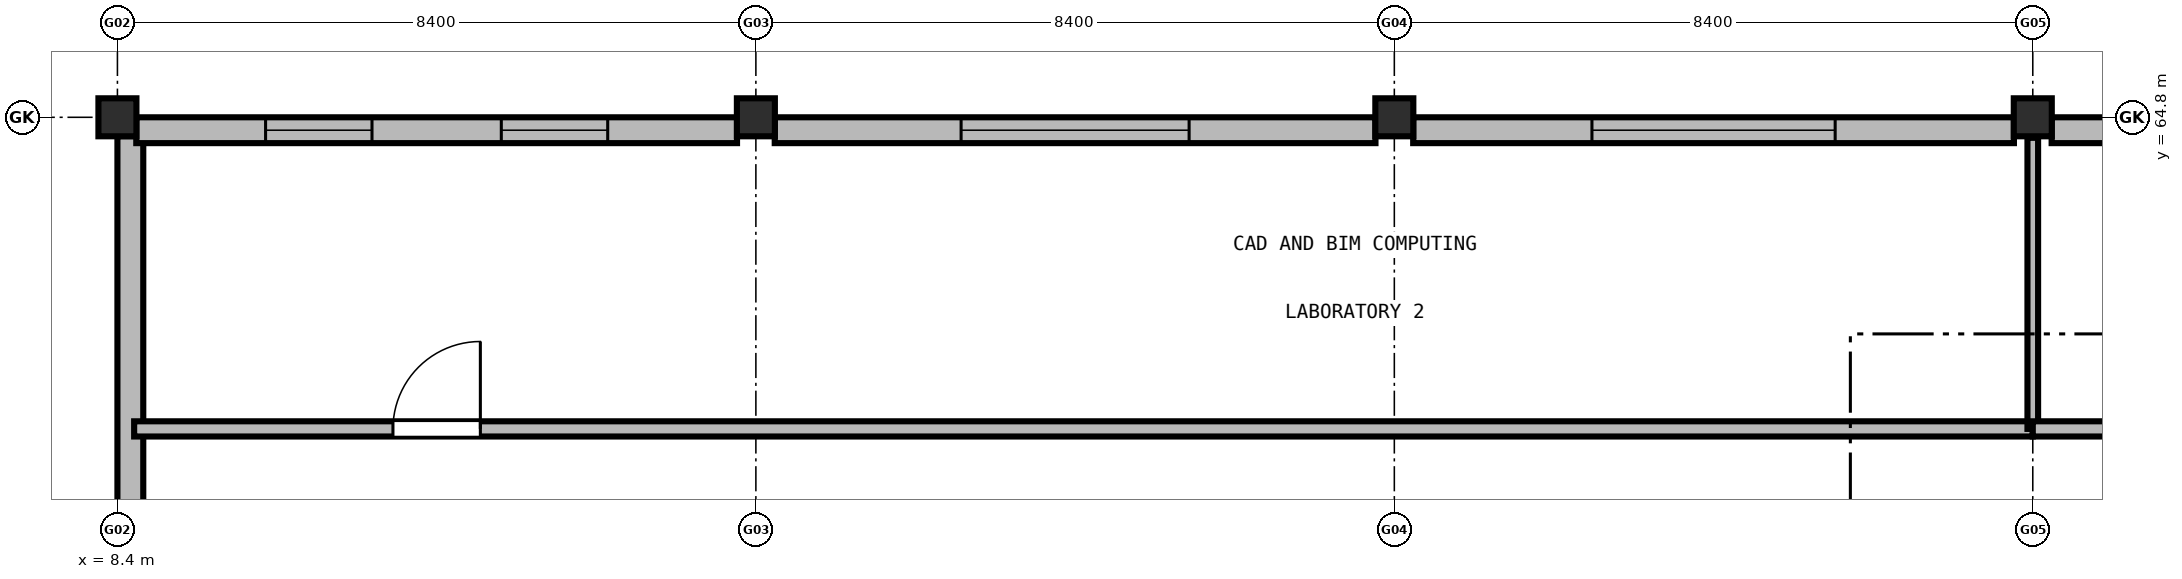
"""IFC4 building model, lengths in metres.
Left out: names, types, materials, properties, quantities, classifications, styles, units other than length and angle.
Written with IfcOpenShell. Run it as: python <this file> out.ifc"""

import sys

from ifc_helpers import new_model, si_unit, direction, frame, frame_2d, origin, origin_2d, place, context, subcontext, project, spatial, rectangle, extrude, element, fill, save


model = new_model("IFC4")
c1 = context("Model", 3, precision=1e-05, world=origin(), true_north=direction((0.0, 1.0)))
c2 = subcontext(c1, "Body", "Model", "MODEL_VIEW")
j1 = project(units=[si_unit("LENGTHUNIT", "METRE"), si_unit("PLANEANGLEUNIT", "RADIAN")], contexts=[c1])
p1 = place(None, origin())
s1 = spatial("IfcSite", under=j1, at=p1, CompositionType="ELEMENT")
p2 = place(p1, origin())
s2 = spatial("IfcBuilding", under=s1, at=p2, CompositionType="ELEMENT")
p3 = place(p2, frame((0.0, 0.0, 9.3)))
s3 = spatial("IfcBuildingStorey", under=s2, at=p3, CompositionType="ELEMENT", Elevation=9.3)
for number, where, z_axis, x_axis in (
    (1, (8.4, 64.8, 0.0), (0.0, 0.0, 1.0), (1.0, 0.0, 0.0)),
    (2, (16.8, 64.8, 0.0), (0.0, 0.0, 1.0), (1.0, 0.0, 0.0)),
    (3, (25.2, 64.8, 0.0), (0.0, 0.0, 1.0), (1.0, 0.0, 0.0)),
    (4, (33.6, 64.8, 0.0), (0.0, 0.0, 1.0), (1.0, 0.0, 0.0)),
):
    element("IfcColumn", number, at=place(p3, frame(where, z_axis=z_axis, x_axis=x_axis)), inside=s3, PredefinedType="COLUMN", context=c2, shape_type="SweptSolid", body=[
        extrude(rectangle(XDim=0.5, YDim=0.5, at=origin_2d()), origin(), (0.0, 0.0, 1.0), 4.2),
    ])
p4 = place(p3, frame((8.57, 57.848, 0.0), z_axis=(0.0, 0.0, 1.0), x_axis=(0.0, 1.0, 0.0)))
e5 = element("IfcWall", 5, at=p4, inside=s3, PredefinedType="SOLIDWALL", context=c2, shape_type="SweptSolid", body=[
    extrude(rectangle(XDim=6.704, YDim=0.34, at=frame_2d((3.352, 0.0))), origin(), (0.0, 0.0, 1.0), 3.33),
])
p5 = place(p3, frame((8.648, 64.63, 0.0), z_axis=(0.0, 0.0, 1.0), x_axis=(1.0, 0.0, 0.0)))
e6 = element("IfcWall", 6, at=p5, inside=s3, PredefinedType="SOLIDWALL", context=c2, shape_type="SweptSolid", body=[
    extrude(rectangle(XDim=7.904, YDim=0.34, at=frame_2d((3.952, 0.0))), origin(), (0.0, 0.0, 1.0), 3.18),
])
p6 = place(p5, frame((1.701, 0.0, 0.95)))
e7 = element("IfcOpeningElement", 7, at=p6, cuts=e6, PredefinedType="OPENING", context=c2, shape_type="SweptSolid", body=[
    extrude(rectangle(XDim=1.4, YDim=1.9, at=frame_2d((0.7, 0.95))), frame((0.0, 0.18, 0.0), z_axis=(0.0, -1.0, 0.0), x_axis=(1.0, 0.0, 0.0)), (0.0, 0.0, 1.0), 0.36),
])
p7 = place(p5, frame((4.802, 0.0, 0.95)))
e8 = element("IfcOpeningElement", 8, at=p7, cuts=e6, PredefinedType="OPENING", context=c2, shape_type="SweptSolid", body=[
    extrude(rectangle(XDim=1.4, YDim=1.9, at=frame_2d((0.7, 0.95))), frame((0.0, 0.18, 0.0), z_axis=(0.0, -1.0, 0.0), x_axis=(1.0, 0.0, 0.0)), (0.0, 0.0, 1.0), 0.36),
])
p8 = place(p3, frame((17.048, 64.63, 0.0), z_axis=(0.0, 0.0, 1.0), x_axis=(1.0, 0.0, 0.0)))
e9 = element("IfcWall", 9, at=p8, inside=s3, PredefinedType="SOLIDWALL", context=c2, shape_type="SweptSolid", body=[
    extrude(rectangle(XDim=7.904, YDim=0.34, at=frame_2d((3.952, 0.0))), origin(), (0.0, 0.0, 1.0), 3.18),
])
p9 = place(p8, frame((2.452, 0.0, 0.95)))
e10 = element("IfcOpeningElement", 10, at=p9, cuts=e9, PredefinedType="OPENING", context=c2, shape_type="SweptSolid", body=[
    extrude(rectangle(XDim=3.0, YDim=1.98, at=frame_2d((1.5, 0.99))), frame((0.0, 0.18, 0.0), z_axis=(0.0, -1.0, 0.0), x_axis=(1.0, 0.0, 0.0)), (0.0, 0.0, 1.0), 0.36),
])
p10 = place(p3, frame((25.448, 64.63, 0.0), z_axis=(0.0, 0.0, 1.0), x_axis=(1.0, 0.0, 0.0)))
e11 = element("IfcWall", 11, at=p10, inside=s3, PredefinedType="SOLIDWALL", context=c2, shape_type="SweptSolid", body=[
    extrude(rectangle(XDim=7.904, YDim=0.34, at=frame_2d((3.952, 0.0))), origin(), (0.0, 0.0, 1.0), 3.18),
])
p11 = place(p10, frame((2.352, 0.0, 0.95)))
e12 = element("IfcOpeningElement", 12, at=p11, cuts=e11, PredefinedType="OPENING", context=c2, shape_type="SweptSolid", body=[
    extrude(rectangle(XDim=3.2, YDim=1.98, at=frame_2d((1.6, 0.99))), frame((0.0, 0.18, 0.0), z_axis=(0.0, -1.0, 0.0), x_axis=(1.0, 0.0, 0.0)), (0.0, 0.0, 1.0), 0.36),
])
p12 = place(p3, frame((33.848, 64.63, 0.0), z_axis=(0.0, 0.0, 1.0), x_axis=(1.0, 0.0, 0.0)))
e13 = element("IfcWall", 13, at=p12, inside=s3, PredefinedType="SOLIDWALL", context=c2, shape_type="SweptSolid", body=[
    extrude(rectangle(XDim=7.904, YDim=0.34, at=frame_2d((3.952, 0.0))), origin(), (0.0, 0.0, 1.0), 3.18),
])
p13 = place(p12, frame((2.552, 0.0, 0.95)))
e14 = element("IfcOpeningElement", 14, at=p13, cuts=e13, PredefinedType="OPENING", context=c2, shape_type="SweptSolid", body=[
    extrude(rectangle(XDim=2.8, YDim=1.98, at=frame_2d((1.4, 0.99))), frame((0.0, 0.18, 0.0), z_axis=(0.0, -1.0, 0.0), x_axis=(1.0, 0.0, 0.0)), (0.0, 0.0, 1.0), 0.36),
])
p14 = place(p3, frame((8.62, 60.7, 0.0), z_axis=(0.0, 0.0, 1.0), x_axis=(1.0, 0.0, 0.0)))
e15 = element("IfcWall", 15, at=p14, inside=s3, PredefinedType="SOLIDWALL", context=c2, shape_type="SweptSolid", body=[
    extrude(rectangle(XDim=24.98, YDim=0.2, at=frame_2d((12.49, 0.0))), origin(), (0.0, 0.0, 1.0), 3.325),
])
p15 = place(p14, frame((3.405, 0.0, 0.0)))
e16 = element("IfcOpeningElement", 16, at=p15, cuts=e15, PredefinedType="OPENING", context=c2, shape_type="SweptSolid", body=[
    extrude(rectangle(XDim=1.15, YDim=2.15, at=frame_2d((0.575, 1.075))), frame((0.0, 0.11, 0.0), z_axis=(0.0, -1.0, 0.0), x_axis=(1.0, 0.0, 0.0)), (0.0, 0.0, 1.0), 0.22),
])
p16 = place(p3, frame((33.6, 60.7, 0.0), z_axis=(0.0, 0.0, 1.0), x_axis=(0.0, 1.0, 0.0)))
e17 = element("IfcWall", 17, at=p16, inside=s3, PredefinedType="PARTITIONING", context=c2, shape_type="SweptSolid", body=[
    extrude(rectangle(XDim=3.83, YDim=0.14, at=frame_2d((1.915, 0.0))), origin(), (0.0, 0.0, 1.0), 3.175),
])
p17 = place(p3, frame((33.6, 60.7, 0.0), z_axis=(0.0, 0.0, 1.0), x_axis=(1.0, 0.0, 0.0)))
e18 = element("IfcWall", 18, at=p17, inside=s3, PredefinedType="SOLIDWALL", context=c2, shape_type="SweptSolid", body=[
    extrude(rectangle(XDim=25.2, YDim=0.2, at=frame_2d((12.6, 0.0))), origin(), (0.0, 0.0, 1.0), 3.325),
])
p18 = place(p17, frame((3.375, 0.0, 0.0)))
e19 = element("IfcOpeningElement", 19, at=p18, cuts=e18, PredefinedType="OPENING", context=c2, shape_type="SweptSolid", body=[
    extrude(rectangle(XDim=1.65, YDim=2.2, at=frame_2d((0.825, 1.1))), frame((0.0, 0.11, 0.0), z_axis=(0.0, -1.0, 0.0), x_axis=(1.0, 0.0, 0.0)), (0.0, 0.0, 1.0), 0.22),
])
p19 = place(p6, origin())
e20 = element("IfcWindow", 20, at=p19, inside=s3, PartitioningType="SINGLE_PANEL", PredefinedType="WINDOW", context=c2, shape_type="SweptSolid", body=[
    extrude(rectangle(XDim=1.4, YDim=1.9, at=frame_2d((0.7, 0.95))), frame((0.0, 0.03, 0.0), z_axis=(0.0, -1.0, 0.0), x_axis=(1.0, 0.0, 0.0)), (0.0, 0.0, 1.0), 0.06),
])
fill(e7, e20)
p20 = place(p7, origin())
e21 = element("IfcWindow", 21, at=p20, inside=s3, PartitioningType="SINGLE_PANEL", PredefinedType="WINDOW", context=c2, shape_type="SweptSolid", body=[
    extrude(rectangle(XDim=1.4, YDim=1.9, at=frame_2d((0.7, 0.95))), frame((0.0, 0.03, 0.0), z_axis=(0.0, -1.0, 0.0), x_axis=(1.0, 0.0, 0.0)), (0.0, 0.0, 1.0), 0.06),
])
fill(e8, e21)
p21 = place(p9, origin())
e22 = element("IfcWindow", 22, at=p21, inside=s3, PartitioningType="SINGLE_PANEL", PredefinedType="WINDOW", context=c2, shape_type="SweptSolid", body=[
    extrude(rectangle(XDim=3.0, YDim=1.98, at=frame_2d((1.5, 0.99))), frame((0.0, 0.03, 0.0), z_axis=(0.0, -1.0, 0.0), x_axis=(1.0, 0.0, 0.0)), (0.0, 0.0, 1.0), 0.06),
])
fill(e10, e22)
p22 = place(p11, origin())
e23 = element("IfcWindow", 23, at=p22, inside=s3, PartitioningType="SINGLE_PANEL", PredefinedType="WINDOW", context=c2, shape_type="SweptSolid", body=[
    extrude(rectangle(XDim=3.2, YDim=1.98, at=frame_2d((1.6, 0.99))), frame((0.0, 0.03, 0.0), z_axis=(0.0, -1.0, 0.0), x_axis=(1.0, 0.0, 0.0)), (0.0, 0.0, 1.0), 0.06),
])
fill(e12, e23)
p23 = place(p15, origin())
e24 = element("IfcDoor", 24, at=p23, inside=s3, OperationType="SINGLE_SWING_RIGHT", PredefinedType="DOOR", context=c2, shape_type="SweptSolid", body=[
    extrude(rectangle(XDim=1.15, YDim=2.15, at=frame_2d((0.575, 1.075))), frame((0.0, 0.025, 0.0), z_axis=(0.0, -1.0, 0.0), x_axis=(1.0, 0.0, 0.0)), (0.0, 0.0, 1.0), 0.05),
])
fill(e16, e24)
save(model, sys.argv[1])
